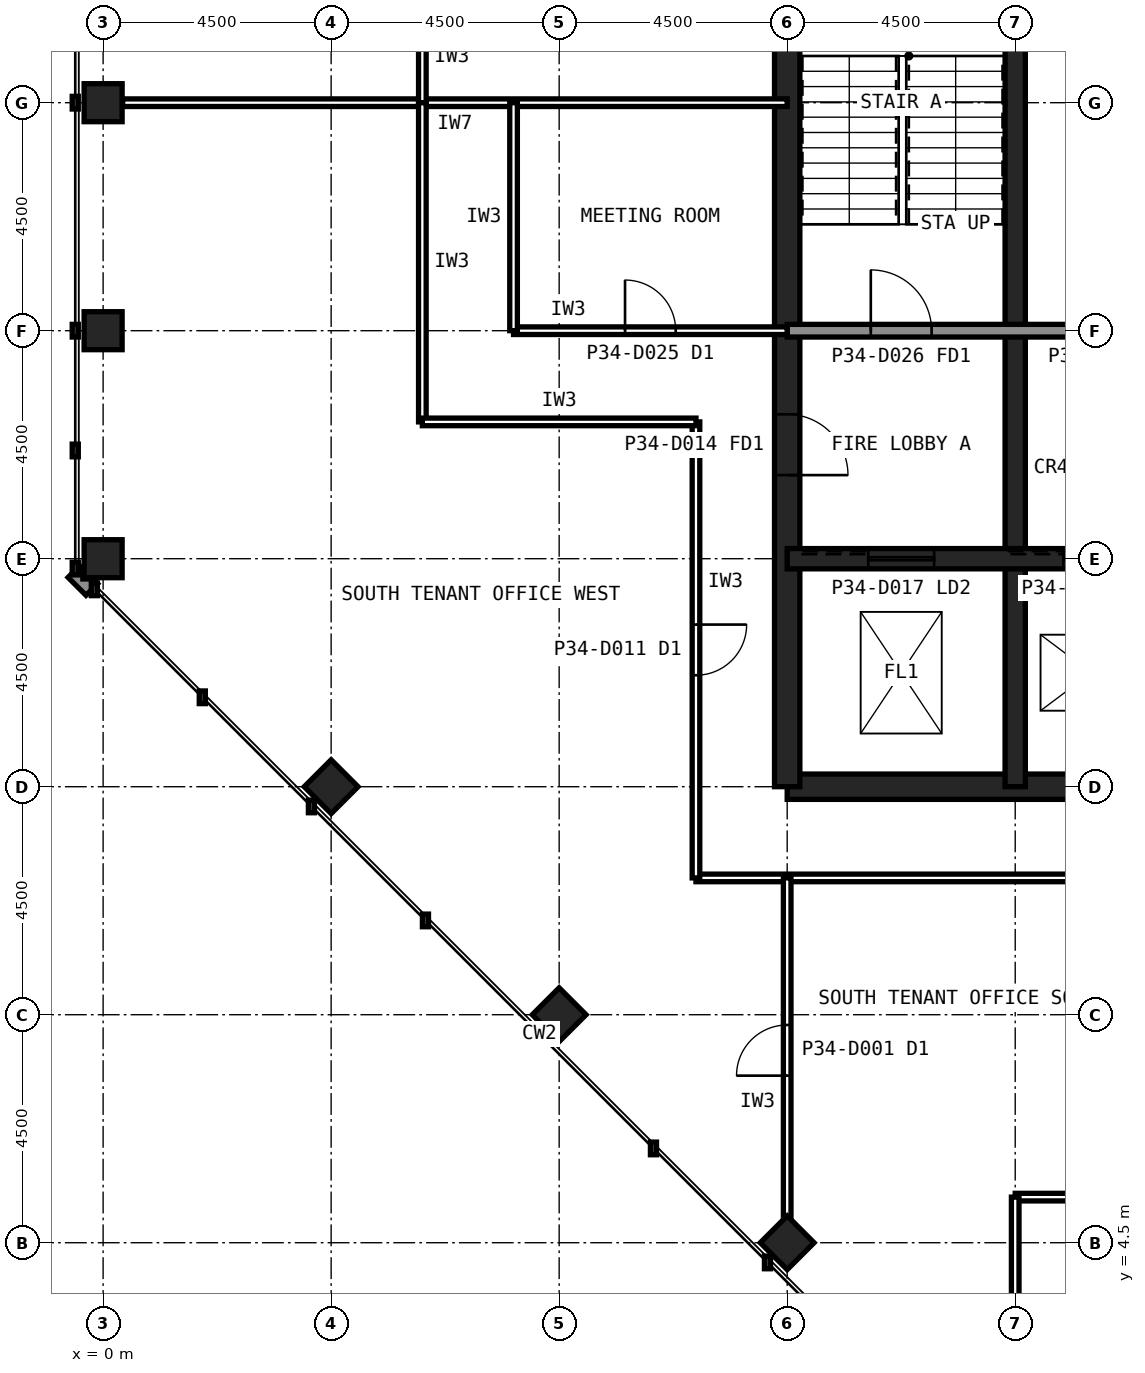
"""IFC4 building model, lengths in metres.
Left out: names, types, materials, properties, quantities, classifications, styles, units other than length and angle.
Written with IfcOpenShell. Run it as: python <this file> out.ifc"""

import sys

from ifc_helpers import new_model, si_unit, direction, frame, frame_2d, origin, origin_2d, place, context, subcontext, project, spatial, rectangle, hollow_rectangle, extrude, element, fill, save


model = new_model("IFC4")
c1 = context("Model", 3, precision=1e-05, world=origin(), true_north=direction((0.0, 1.0)))
c2 = subcontext(c1, "Body", "Model", "MODEL_VIEW")
j1 = project(units=[si_unit("LENGTHUNIT", "METRE"), si_unit("PLANEANGLEUNIT", "RADIAN")], contexts=[c1])
p1 = place(None, origin())
s1 = spatial("IfcSite", under=j1, at=p1, CompositionType="ELEMENT")
p2 = place(p1, origin())
s2 = spatial("IfcBuilding", under=s1, at=p2, CompositionType="ELEMENT")
p3 = place(p2, frame((0.0, 0.0, 143.6)))
s3 = spatial("IfcBuildingStorey", under=s2, at=p3, CompositionType="ELEMENT", Elevation=143.6)
for number, where, z_axis, x_axis in (
    (1, (0.0, 27.0, 0.0), (0.0, 0.0, 1.0), (1.0, 0.0, 0.0)),
    (2, (0.0, 22.5, 0.0), (0.0, 0.0, 1.0), (1.0, 0.0, 0.0)),
    (3, (0.0, 18.0, 0.0), (0.0, 0.0, 1.0), (1.0, 0.0, 0.0)),
    (4, (13.5, 4.5, 0.0), (0.0, 0.0, 1.0), (0.707, 0.707, 0.0)),
    (5, (9.0, 9.0, 0.0), (0.0, 0.0, 1.0), (0.707, 0.707, 0.0)),
    (6, (4.5, 13.5, 0.0), (0.0, 0.0, 1.0), (0.707, 0.707, 0.0)),
):
    element("IfcColumn", number, at=place(p3, frame(where, z_axis=z_axis, x_axis=x_axis)), inside=s3, PredefinedType="COLUMN", context=c2, shape_type="SweptSolid", body=[
        extrude(hollow_rectangle(XDim=0.75, YDim=0.75, WallThickness=0.04, at=origin_2d()), origin(), (0.0, 0.0, 1.0), 4.0),
    ])
p4 = place(p3, frame((13.5, 13.5, 0.0), z_axis=(0.0, 0.0, 1.0), x_axis=(1.0, 0.0, 0.0)))
e7 = element("IfcWall", 7, at=p4, inside=s3, PredefinedType="SHEAR", context=c2, shape_type="SweptSolid", body=[
    extrude(rectangle(XDim=27.0, YDim=0.5, at=frame_2d((13.5, 0.0))), origin(), (0.0, 0.0, 1.0), 4.0),
])
p5 = place(p3, frame((13.5, 40.5, 0.0), z_axis=(0.0, 0.0, 1.0), x_axis=(0.0, -1.0, 0.0)))
e8 = element("IfcWall", 8, at=p5, inside=s3, PredefinedType="SHEAR", context=c2, shape_type="SweptSolid", body=[
    extrude(rectangle(XDim=27.0, YDim=0.5, at=frame_2d((13.5, 0.0))), origin(), (0.0, 0.0, 1.0), 4.0),
])
p6 = place(p5, frame((19.65, 0.0, 0.0)))
e9 = element("IfcOpeningElement", 9, at=p6, cuts=e8, PredefinedType="OPENING", context=c2, shape_type="SweptSolid", body=[
    extrude(rectangle(XDim=1.2, YDim=2.1, at=frame_2d((0.6, 1.05))), frame((0.0, 0.26, 0.0), z_axis=(0.0, -1.0, 0.0), x_axis=(1.0, 0.0, 0.0)), (0.0, 0.0, 1.0), 0.52),
])
p7 = place(p5, frame((5.85, 0.0, 0.0)))
e10 = element("IfcOpeningElement", 10, at=p7, cuts=e8, PredefinedType="OPENING", context=c2, shape_type="SweptSolid", body=[
    extrude(rectangle(XDim=1.8, YDim=2.1, at=frame_2d((0.9, 1.05))), frame((0.0, 0.26, 0.0), z_axis=(0.0, -1.0, 0.0), x_axis=(1.0, 0.0, 0.0)), (0.0, 0.0, 1.0), 0.52),
])
p8 = place(p3, frame((18.0, 13.5, 0.0), z_axis=(0.0, 0.0, 1.0), x_axis=(0.0, 1.0, 0.0)))
e11 = element("IfcWall", 11, at=p8, inside=s3, PredefinedType="SHEAR", context=c2, shape_type="SweptSolid", body=[
    extrude(rectangle(XDim=18.0, YDim=0.4, at=frame_2d((9.0, 0.0))), origin(), (0.0, 0.0, 1.0), 4.0),
])
p9 = place(p3, frame((13.5, 18.0, 0.0), z_axis=(0.0, 0.0, 1.0), x_axis=(1.0, 0.0, 0.0)))
e12 = element("IfcWall", 12, at=p9, inside=s3, PredefinedType="SHEAR", context=c2, shape_type="SweptSolid", body=[
    extrude(rectangle(XDim=27.0, YDim=0.4, at=frame_2d((13.5, 0.0))), origin(), (0.0, 0.0, 1.0), 4.0),
])
p10 = place(p9, frame((24.3, 0.0, 0.0)))
e13 = element("IfcOpeningElement", 13, at=p10, cuts=e12, PredefinedType="OPENING", context=c2, shape_type="SweptSolid", body=[
    extrude(rectangle(XDim=0.9, YDim=2.1, at=frame_2d((0.45, 1.05))), frame((0.0, 0.21, 0.0), z_axis=(0.0, -1.0, 0.0), x_axis=(1.0, 0.0, 0.0)), (0.0, 0.0, 1.0), 0.42),
])
p11 = place(p9, frame((5.45, 0.0, 0.0)))
e14 = element("IfcOpeningElement", 14, at=p11, cuts=e12, PredefinedType="OPENING", context=c2, shape_type="SweptSolid", body=[
    extrude(rectangle(XDim=1.1, YDim=2.1, at=frame_2d((0.55, 1.05))), frame((0.0, 0.21, 0.0), z_axis=(0.0, -1.0, 0.0), x_axis=(1.0, 0.0, 0.0)), (0.0, 0.0, 1.0), 0.42),
])
p12 = place(p9, frame((8.45, 0.0, 0.0)))
e15 = element("IfcOpeningElement", 15, at=p12, cuts=e12, PredefinedType="OPENING", context=c2, shape_type="SweptSolid", body=[
    extrude(rectangle(XDim=1.1, YDim=2.1, at=frame_2d((0.55, 1.05))), frame((0.0, 0.21, 0.0), z_axis=(0.0, -1.0, 0.0), x_axis=(1.0, 0.0, 0.0)), (0.0, 0.0, 1.0), 0.42),
])
p13 = place(p9, frame((11.45, 0.0, 0.0)))
e16 = element("IfcOpeningElement", 16, at=p13, cuts=e12, PredefinedType="OPENING", context=c2, shape_type="SweptSolid", body=[
    extrude(rectangle(XDim=1.1, YDim=2.1, at=frame_2d((0.55, 1.05))), frame((0.0, 0.21, 0.0), z_axis=(0.0, -1.0, 0.0), x_axis=(1.0, 0.0, 0.0)), (0.0, 0.0, 1.0), 0.42),
])
p14 = place(p9, frame((14.45, 0.0, 0.0)))
e17 = element("IfcOpeningElement", 17, at=p14, cuts=e12, PredefinedType="OPENING", context=c2, shape_type="SweptSolid", body=[
    extrude(rectangle(XDim=1.1, YDim=2.1, at=frame_2d((0.55, 1.05))), frame((0.0, 0.21, 0.0), z_axis=(0.0, -1.0, 0.0), x_axis=(1.0, 0.0, 0.0)), (0.0, 0.0, 1.0), 0.42),
])
p15 = place(p9, frame((17.45, 0.0, 0.0)))
e18 = element("IfcOpeningElement", 18, at=p15, cuts=e12, PredefinedType="OPENING", context=c2, shape_type="SweptSolid", body=[
    extrude(rectangle(XDim=1.1, YDim=2.1, at=frame_2d((0.55, 1.05))), frame((0.0, 0.21, 0.0), z_axis=(0.0, -1.0, 0.0), x_axis=(1.0, 0.0, 0.0)), (0.0, 0.0, 1.0), 0.42),
])
p16 = place(p9, frame((20.45, 0.0, 0.0)))
e19 = element("IfcOpeningElement", 19, at=p16, cuts=e12, PredefinedType="OPENING", context=c2, shape_type="SweptSolid", body=[
    extrude(rectangle(XDim=1.1, YDim=2.1, at=frame_2d((0.55, 1.05))), frame((0.0, 0.21, 0.0), z_axis=(0.0, -1.0, 0.0), x_axis=(1.0, 0.0, 0.0)), (0.0, 0.0, 1.0), 0.42),
])
p17 = place(p9, frame((1.6, 0.0, 0.0)))
e20 = element("IfcOpeningElement", 20, at=p17, cuts=e12, PredefinedType="OPENING", context=c2, shape_type="SweptSolid", body=[
    extrude(rectangle(XDim=1.3, YDim=2.2, at=frame_2d((0.65, 1.1))), frame((0.0, 0.21, 0.0), z_axis=(0.0, -1.0, 0.0), x_axis=(1.0, 0.0, 0.0)), (0.0, 0.0, 1.0), 0.42),
])
p18 = place(p3, frame((13.5, 22.5, 0.0), z_axis=(0.0, 0.0, 1.0), x_axis=(1.0, 0.0, 0.0)))
e21 = element("IfcWall", 21, at=p18, inside=s3, PredefinedType="SOLIDWALL", context=c2, shape_type="SweptSolid", body=[
    extrude(rectangle(XDim=27.0, YDim=0.25, at=frame_2d((13.5, 0.0))), origin(), (0.0, 0.0, 1.0), 3.84),
])
p19 = place(p18, frame((1.65, 0.0, 0.0)))
e22 = element("IfcOpeningElement", 22, at=p19, cuts=e21, PredefinedType="OPENING", context=c2, shape_type="SweptSolid", body=[
    extrude(rectangle(XDim=1.2, YDim=2.1, at=frame_2d((0.6, 1.05))), frame((0.0, 0.135, 0.0), z_axis=(0.0, -1.0, 0.0), x_axis=(1.0, 0.0, 0.0)), (0.0, 0.0, 1.0), 0.27),
])
p20 = place(p18, frame((6.025, 0.0, 0.0)))
e23 = element("IfcOpeningElement", 23, at=p20, cuts=e21, PredefinedType="OPENING", context=c2, shape_type="SweptSolid", body=[
    extrude(rectangle(XDim=1.0, YDim=2.1, at=frame_2d((0.5, 1.05))), frame((0.0, 0.135, 0.0), z_axis=(0.0, -1.0, 0.0), x_axis=(1.0, 0.0, 0.0)), (0.0, 0.0, 1.0), 0.27),
])
p21 = place(p18, frame((10.525, 0.0, 0.0)))
e24 = element("IfcOpeningElement", 24, at=p21, cuts=e21, PredefinedType="OPENING", context=c2, shape_type="SweptSolid", body=[
    extrude(rectangle(XDim=1.0, YDim=2.1, at=frame_2d((0.5, 1.05))), frame((0.0, 0.135, 0.0), z_axis=(0.0, -1.0, 0.0), x_axis=(1.0, 0.0, 0.0)), (0.0, 0.0, 1.0), 0.27),
])
p22 = place(p18, frame((19.75, 0.0, 0.0)))
e25 = element("IfcOpeningElement", 25, at=p22, cuts=e21, PredefinedType="OPENING", context=c2, shape_type="SweptSolid", body=[
    extrude(rectangle(XDim=1.0, YDim=2.1, at=frame_2d((0.5, 1.05))), frame((0.0, 0.135, 0.0), z_axis=(0.0, -1.0, 0.0), x_axis=(1.0, 0.0, 0.0)), (0.0, 0.0, 1.0), 0.27),
])
p23 = place(p18, frame((15.05, 0.0, 0.0)))
e26 = element("IfcOpeningElement", 26, at=p23, cuts=e21, PredefinedType="OPENING", context=c2, shape_type="SweptSolid", body=[
    extrude(rectangle(XDim=1.4, YDim=2.4, at=frame_2d((0.7, 1.2))), frame((0.0, 0.135, 0.0), z_axis=(0.0, -1.0, 0.0), x_axis=(1.0, 0.0, 0.0)), (0.0, 0.0, 1.0), 0.27),
])
p24 = place(p3, frame((0.385, 27.0, 0.0), z_axis=(0.0, 0.0, 1.0), x_axis=(1.0, 0.0, 0.0)))
e27 = element("IfcWall", 27, at=p24, inside=s3, PredefinedType="PARTITIONING", context=c2, shape_type="SweptSolid", body=[
    extrude(rectangle(XDim=13.115, YDim=0.15, at=frame_2d((6.558, 0.0))), origin(), (0.0, 0.0, 1.0), 2.989),
])
p25 = place(p3, frame((6.3, 28.8, 0.0), z_axis=(0.0, 0.0, 1.0), x_axis=(0.0, -1.0, 0.0)))
e28 = element("IfcWall", 28, at=p25, inside=s3, PredefinedType="PARTITIONING", context=c2, shape_type="SweptSolid", body=[
    extrude(rectangle(XDim=1.8, YDim=0.15, at=frame_2d((0.9, 0.0))), origin(), (0.0, 0.0, 1.0), 3.84),
])
p26 = place(p3, frame((11.7, 11.7, 0.0), z_axis=(0.0, 0.0, 1.0), x_axis=(1.0, 0.0, 0.0)))
e29 = element("IfcWall", 29, at=p26, inside=s3, PredefinedType="PARTITIONING", context=c2, shape_type="SweptSolid", body=[
    extrude(rectangle(XDim=30.6, YDim=0.15, at=frame_2d((15.3, 0.0))), origin(), (0.0, 0.0, 1.0), 3.84),
])
p27 = place(p26, frame((13.75, 0.0, 0.0)))
e30 = element("IfcOpeningElement", 30, at=p27, cuts=e29, PredefinedType="OPENING", context=c2, shape_type="SweptSolid", body=[
    extrude(rectangle(XDim=1.0, YDim=2.1, at=frame_2d((0.5, 1.05))), frame((0.0, 0.085, 0.0), z_axis=(0.0, -1.0, 0.0), x_axis=(1.0, 0.0, 0.0)), (0.0, 0.0, 1.0), 0.17),
])
p28 = place(p3, frame((11.7, 20.7, 0.0), z_axis=(0.0, 0.0, 1.0), x_axis=(0.0, -1.0, 0.0)))
e31 = element("IfcWall", 31, at=p28, inside=s3, PredefinedType="PARTITIONING", context=c2, shape_type="SweptSolid", body=[
    extrude(rectangle(XDim=9.0, YDim=0.15, at=frame_2d((4.5, 0.0))), origin(), (0.0, 0.0, 1.0), 3.84),
])
p29 = place(p28, frame((4.0, 0.0, 0.0)))
e32 = element("IfcOpeningElement", 32, at=p29, cuts=e31, PredefinedType="OPENING", context=c2, shape_type="SweptSolid", body=[
    extrude(rectangle(XDim=1.0, YDim=2.1, at=frame_2d((0.5, 1.05))), frame((0.0, 0.085, 0.0), z_axis=(0.0, -1.0, 0.0), x_axis=(1.0, 0.0, 0.0)), (0.0, 0.0, 1.0), 0.17),
])
p30 = place(p3, frame((6.3, 27.0, 0.0), z_axis=(0.0, 0.0, 1.0), x_axis=(0.0, -1.0, 0.0)))
e33 = element("IfcWall", 33, at=p30, inside=s3, PredefinedType="PARTITIONING", context=c2, shape_type="SweptSolid", body=[
    extrude(rectangle(XDim=6.3, YDim=0.15, at=frame_2d((3.15, 0.0))), origin(), (0.0, 0.0, 1.0), 3.84),
])
p31 = place(p3, frame((6.3, 20.7, 0.0), z_axis=(0.0, 0.0, 1.0), x_axis=(1.0, 0.0, 0.0)))
e34 = element("IfcWall", 34, at=p31, inside=s3, PredefinedType="PARTITIONING", context=c2, shape_type="SweptSolid", body=[
    extrude(rectangle(XDim=5.4, YDim=0.15, at=frame_2d((2.7, 0.0))), origin(), (0.0, 0.0, 1.0), 3.84),
])
p32 = place(p3, frame((22.5, 5.4, 0.0), z_axis=(0.0, 0.0, 1.0), x_axis=(-1.0, 0.0, 0.0)))
e35 = element("IfcWall", 35, at=p32, inside=s3, PredefinedType="PARTITIONING", context=c2, shape_type="SweptSolid", body=[
    extrude(rectangle(XDim=4.5, YDim=0.15, at=frame_2d((2.25, 0.0))), origin(), (0.0, 0.0, 1.0), 3.84),
])
p33 = place(p32, frame((1.75, 0.0, 0.0)))
e36 = element("IfcOpeningElement", 36, at=p33, cuts=e35, PredefinedType="OPENING", context=c2, shape_type="SweptSolid", body=[
    extrude(rectangle(XDim=1.0, YDim=2.1, at=frame_2d((0.5, 1.05))), frame((0.0, 0.085, 0.0), z_axis=(0.0, -1.0, 0.0), x_axis=(1.0, 0.0, 0.0)), (0.0, 0.0, 1.0), 0.17),
])
p34 = place(p3, frame((18.0, 5.4, 0.0), z_axis=(0.0, 0.0, 1.0), x_axis=(0.0, -1.0, 0.0)))
e37 = element("IfcWall", 37, at=p34, inside=s3, PredefinedType="PARTITIONING", context=c2, shape_type="SweptSolid", body=[
    extrude(rectangle(XDim=5.015, YDim=0.15, at=frame_2d((2.507, 0.0))), origin(), (0.0, 0.0, 1.0), 2.989),
])
p35 = place(p3, frame((8.1, 22.5, 0.0), z_axis=(0.0, 0.0, 1.0), x_axis=(1.0, 0.0, 0.0)))
e38 = element("IfcWall", 38, at=p35, inside=s3, PredefinedType="PARTITIONING", context=c2, shape_type="SweptSolid", body=[
    extrude(rectangle(XDim=5.4, YDim=0.15, at=frame_2d((2.7, 0.0))), origin(), (0.0, 0.0, 1.0), 2.989),
])
p36 = place(p35, frame((2.2, 0.0, 0.0)))
e39 = element("IfcOpeningElement", 39, at=p36, cuts=e38, PredefinedType="OPENING", context=c2, shape_type="SweptSolid", body=[
    extrude(rectangle(XDim=1.0, YDim=2.1, at=frame_2d((0.5, 1.05))), frame((0.0, 0.085, 0.0), z_axis=(0.0, -1.0, 0.0), x_axis=(1.0, 0.0, 0.0)), (0.0, 0.0, 1.0), 0.17),
])
p37 = place(p3, frame((8.1, 27.0, 0.0), z_axis=(0.0, 0.0, 1.0), x_axis=(0.0, -1.0, 0.0)))
e40 = element("IfcWall", 40, at=p37, inside=s3, PredefinedType="PARTITIONING", context=c2, shape_type="SweptSolid", body=[
    extrude(rectangle(XDim=4.5, YDim=0.15, at=frame_2d((2.25, 0.0))), origin(), (0.0, 0.0, 1.0), 3.84),
])
p38 = place(p3, frame((13.5, 4.895, 0.0), z_axis=(0.0, 0.0, 1.0), x_axis=(0.0, 1.0, 0.0)))
e41 = element("IfcWall", 41, at=p38, inside=s3, PredefinedType="PARTITIONING", context=c2, shape_type="SweptSolid", body=[
    extrude(rectangle(XDim=6.805, YDim=0.15, at=frame_2d((3.402, 0.0))), origin(), (0.0, 0.0, 1.0), 2.989),
])
p39 = place(p38, frame((2.903, 0.0, 0.0)))
e42 = element("IfcOpeningElement", 42, at=p39, cuts=e41, PredefinedType="OPENING", context=c2, shape_type="SweptSolid", body=[
    extrude(rectangle(XDim=1.0, YDim=2.1, at=frame_2d((0.5, 1.05))), frame((0.0, 0.085, 0.0), z_axis=(0.0, -1.0, 0.0), x_axis=(1.0, 0.0, 0.0)), (0.0, 0.0, 1.0), 0.17),
])
p40 = place(p6, origin())
e43 = element("IfcDoor", 43, at=p40, inside=s3, OperationType="SINGLE_SWING_RIGHT", PredefinedType="DOOR", context=c2, shape_type="SweptSolid", body=[
    extrude(rectangle(XDim=1.2, YDim=2.1, at=frame_2d((0.6, 1.05))), frame((0.0, 0.025, 0.0), z_axis=(0.0, -1.0, 0.0), x_axis=(1.0, 0.0, 0.0)), (0.0, 0.0, 1.0), 0.05),
])
fill(e9, e43)
p41 = place(p19, origin())
e44 = element("IfcDoor", 44, at=p41, inside=s3, OperationType="SINGLE_SWING_LEFT", PredefinedType="DOOR", context=c2, shape_type="SweptSolid", body=[
    extrude(rectangle(XDim=1.2, YDim=2.1, at=frame_2d((0.6, 1.05))), frame((0.0, 0.025, 0.0), z_axis=(0.0, -1.0, 0.0), x_axis=(1.0, 0.0, 0.0)), (0.0, 0.0, 1.0), 0.05),
])
fill(e22, e44)
p42 = place(p11, origin())
e45 = element("IfcDoor", 45, at=p42, inside=s3, OperationType="SLIDING_TO_LEFT", PredefinedType="DOOR", context=c2, shape_type="SweptSolid", body=[
    extrude(rectangle(XDim=1.1, YDim=2.1, at=frame_2d((0.55, 1.05))), frame((0.0, 0.025, 0.0), z_axis=(0.0, -1.0, 0.0), x_axis=(1.0, 0.0, 0.0)), (0.0, 0.0, 1.0), 0.05),
])
fill(e14, e45)
p43 = place(p17, origin())
e46 = element("IfcDoor", 46, at=p43, inside=s3, OperationType="SLIDING_TO_LEFT", PredefinedType="DOOR", context=c2, shape_type="SweptSolid", body=[
    extrude(rectangle(XDim=1.3, YDim=2.2, at=frame_2d((0.65, 1.1))), frame((0.0, 0.025, 0.0), z_axis=(0.0, -1.0, 0.0), x_axis=(1.0, 0.0, 0.0)), (0.0, 0.0, 1.0), 0.05),
])
fill(e20, e46)
p44 = place(p29, origin())
e47 = element("IfcDoor", 47, at=p44, inside=s3, OperationType="SINGLE_SWING_LEFT", PredefinedType="DOOR", context=c2, shape_type="SweptSolid", body=[
    extrude(rectangle(XDim=1.0, YDim=2.1, at=frame_2d((0.5, 1.05))), frame((0.0, 0.025, 0.0), z_axis=(0.0, -1.0, 0.0), x_axis=(1.0, 0.0, 0.0)), (0.0, 0.0, 1.0), 0.05),
])
fill(e32, e47)
p45 = place(p36, origin())
e48 = element("IfcDoor", 48, at=p45, inside=s3, OperationType="SINGLE_SWING_LEFT", PredefinedType="DOOR", context=c2, shape_type="SweptSolid", body=[
    extrude(rectangle(XDim=1.0, YDim=2.1, at=frame_2d((0.5, 1.05))), frame((0.0, 0.025, 0.0), z_axis=(0.0, -1.0, 0.0), x_axis=(1.0, 0.0, 0.0)), (0.0, 0.0, 1.0), 0.05),
])
fill(e39, e48)
p46 = place(p39, origin())
e49 = element("IfcDoor", 49, at=p46, inside=s3, OperationType="SINGLE_SWING_LEFT", PredefinedType="DOOR", context=c2, shape_type="SweptSolid", body=[
    extrude(rectangle(XDim=1.0, YDim=2.1, at=frame_2d((0.5, 1.05))), frame((0.0, 0.025, 0.0), z_axis=(0.0, -1.0, 0.0), x_axis=(1.0, 0.0, 0.0)), (0.0, 0.0, 1.0), 0.05),
])
fill(e42, e49)
save(model, sys.argv[1])
